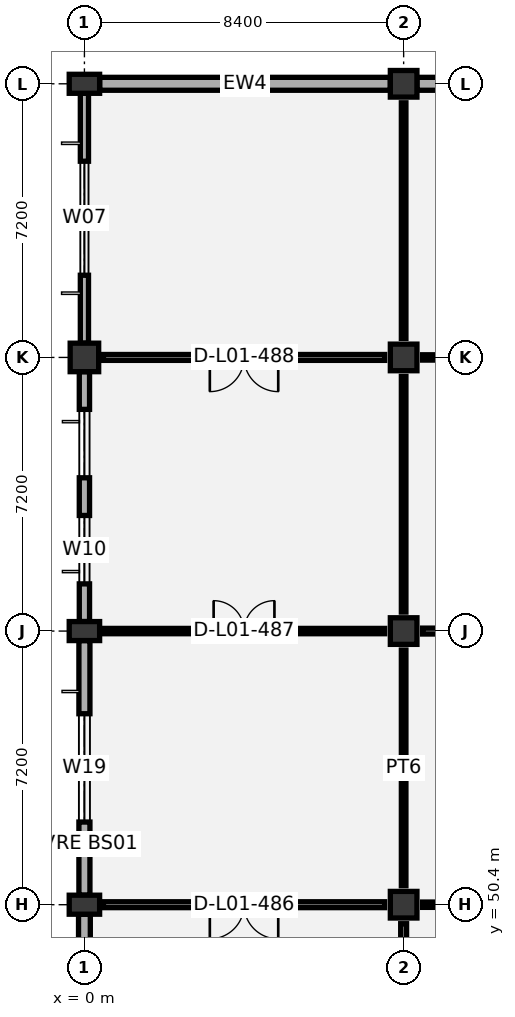
"""IFC4 building model, lengths in metres.
Left out: names, types, materials, properties, quantities, classifications, styles, units other than length and angle.
Written with IfcOpenShell. Run it as: python <this file> out.ifc"""

import sys

from ifc_helpers import new_model, si_unit, direction, frame, frame_2d, origin, origin_2d, place, context, subcontext, project, spatial, rectangle, circle, extrude, element, fill, save


model = new_model("IFC4")
c1 = context("Model", 3, precision=1e-05, world=origin(), true_north=direction((0.0, 1.0)))
c2 = subcontext(c1, "Body", "Model", "MODEL_VIEW")
j1 = project(units=[si_unit("LENGTHUNIT", "METRE"), si_unit("PLANEANGLEUNIT", "RADIAN")], contexts=[c1])
p1 = place(None, origin())
s1 = spatial("IfcSite", under=j1, at=p1, CompositionType="ELEMENT")
p2 = place(p1, origin())
s2 = spatial("IfcBuilding", under=s1, at=p2, CompositionType="ELEMENT")
p3 = place(p2, frame((0.0, 0.0, 6.0)))
s3 = spatial("IfcBuildingStorey", under=s2, at=p3, CompositionType="ELEMENT", Elevation=6.0)
for number, where, z_axis, x_axis in (
    (1, (0.0, 50.4, 0.0), (0.0, 0.0, 1.0), (0.0, 1.0, 0.0)),
    (2, (0.0, 57.6, 0.0), (0.0, 0.0, 1.0), (0.0, 1.0, 0.0)),
):
    element("IfcColumn", number, at=place(p3, frame(where, z_axis=z_axis, x_axis=x_axis)), inside=s3, PredefinedType="COLUMN", context=c2, shape_type="SweptSolid", body=[
        extrude(rectangle(XDim=0.5, YDim=0.8, at=origin_2d()), origin(), (0.0, 0.0, 1.0), 5.4),
    ])
p4 = place(p3, frame((0.0, 64.8, 0.0), z_axis=(0.0, 0.0, 1.0), x_axis=(1.0, 0.0, 0.0)))
e3 = element("IfcColumn", 3, at=p4, inside=s3, PredefinedType="COLUMN", context=c2, shape_type="SweptSolid", body=[
    extrude(circle(Radius=0.375, at=origin_2d()), origin(), (0.0, 0.0, 1.0), 5.4),
])
p5 = place(p3, frame((0.0, 72.0, 0.0), z_axis=(0.0, 0.0, 1.0), x_axis=(0.0, 1.0, 0.0)))
e4 = element("IfcColumn", 4, at=p5, inside=s3, PredefinedType="COLUMN", context=c2, shape_type="SweptSolid", body=[
    extrude(rectangle(XDim=0.5, YDim=0.8, at=origin_2d()), origin(), (0.0, 0.0, 1.0), 5.4),
])
for number, where, z_axis, x_axis in (
    (5, (8.4, 50.4, 0.0), (0.0, 0.0, 1.0), (1.0, 0.0, 0.0)),
    (6, (8.4, 57.6, 0.0), (0.0, 0.0, 1.0), (1.0, 0.0, 0.0)),
    (7, (8.4, 64.8, 0.0), (0.0, 0.0, 1.0), (1.0, 0.0, 0.0)),
    (8, (8.4, 72.0, 0.0), (0.0, 0.0, 1.0), (1.0, 0.0, 0.0)),
):
    element("IfcColumn", number, at=place(p3, frame(where, z_axis=z_axis, x_axis=x_axis)), inside=s3, PredefinedType="COLUMN", context=c2, shape_type="SweptSolid", body=[
        extrude(rectangle(XDim=0.7, YDim=0.7, at=origin_2d()), origin(), (0.0, 0.0, 1.0), 5.4),
    ])
p6 = place(p3, frame((0.0, 43.45, 0.0), z_axis=(0.0, 0.0, 1.0), x_axis=(0.0, 1.0, 0.0)))
e9 = element("IfcWall", 9, at=p6, inside=s3, PredefinedType="SOLIDWALL", context=c2, shape_type="SweptSolid", body=[
    extrude(rectangle(XDim=6.7, YDim=0.31, at=frame_2d((3.35, 0.0))), origin(), (0.0, 0.0, 1.0), 4.52),
])
p7 = place(p6, frame((2.0, 0.0, 0.9)))
e10 = element("IfcOpeningElement", 10, at=p7, cuts=e9, PredefinedType="OPENING", context=c2, shape_type="SweptSolid", body=[
    extrude(rectangle(XDim=2.7, YDim=2.1, at=frame_2d((1.35, 1.05))), frame((0.0, 0.165, 0.0), z_axis=(0.0, -1.0, 0.0), x_axis=(1.0, 0.0, 0.0)), (0.0, 0.0, 1.0), 0.33),
])
p8 = place(p3, frame((0.0, 50.65, 0.0), z_axis=(0.0, 0.0, 1.0), x_axis=(0.0, 1.0, 0.0)))
e11 = element("IfcWall", 11, at=p8, inside=s3, PredefinedType="SOLIDWALL", context=c2, shape_type="SweptSolid", body=[
    extrude(rectangle(XDim=6.7, YDim=0.29, at=frame_2d((3.35, 0.0))), origin(), (0.0, 0.0, 1.0), 4.52),
])
p9 = place(p8, frame((1.925, 0.0, 0.9)))
e12 = element("IfcOpeningElement", 12, at=p9, cuts=e11, PredefinedType="OPENING", context=c2, shape_type="SweptSolid", body=[
    extrude(rectangle(XDim=2.85, YDim=1.95, at=frame_2d((1.425, 0.975))), frame((0.0, 0.155, 0.0), z_axis=(0.0, -1.0, 0.0), x_axis=(1.0, 0.0, 0.0)), (0.0, 0.0, 1.0), 0.31),
])
p10 = place(p3, frame((0.0, 57.85, 0.0), z_axis=(0.0, 0.0, 1.0), x_axis=(0.0, 1.0, 0.0)))
e13 = element("IfcWall", 13, at=p10, inside=s3, PredefinedType="SOLIDWALL", context=c2, shape_type="SweptSolid", body=[
    extrude(rectangle(XDim=6.575, YDim=0.27, at=frame_2d((3.288, 0.0))), origin(), (0.0, 0.0, 1.0), 4.52),
])
p11 = place(p10, frame((0.992, 0.0, 0.9)))
e14 = element("IfcOpeningElement", 14, at=p11, cuts=e13, PredefinedType="OPENING", context=c2, shape_type="SweptSolid", body=[
    extrude(rectangle(XDim=1.8, YDim=2.1, at=frame_2d((0.9, 1.05))), frame((0.0, 0.145, 0.0), z_axis=(0.0, -1.0, 0.0), x_axis=(1.0, 0.0, 0.0)), (0.0, 0.0, 1.0), 0.29),
])
p12 = place(p10, frame((3.783, 0.0, 0.9)))
e15 = element("IfcOpeningElement", 15, at=p12, cuts=e13, PredefinedType="OPENING", context=c2, shape_type="SweptSolid", body=[
    extrude(rectangle(XDim=1.8, YDim=2.1, at=frame_2d((0.9, 1.05))), frame((0.0, 0.145, 0.0), z_axis=(0.0, -1.0, 0.0), x_axis=(1.0, 0.0, 0.0)), (0.0, 0.0, 1.0), 0.29),
])
p13 = place(p3, frame((0.4, 72.0, 0.0), z_axis=(0.0, 0.0, 1.0), x_axis=(1.0, 0.0, 0.0)))
e16 = element("IfcWall", 16, at=p13, inside=s3, PredefinedType="SOLIDWALL", context=c2, shape_type="SweptSolid", body=[
    extrude(rectangle(XDim=7.65, YDim=0.34, at=frame_2d((3.825, 0.0))), origin(), (0.0, 0.0, 1.0), 4.52),
])
p14 = place(p3, frame((0.0, 65.175, 0.0), z_axis=(0.0, 0.0, 1.0), x_axis=(0.0, 1.0, 0.0)))
e17 = element("IfcWall", 17, at=p14, inside=s3, PredefinedType="SOLIDWALL", context=c2, shape_type="SweptSolid", body=[
    extrude(rectangle(XDim=6.575, YDim=0.215, at=frame_2d((3.288, 0.0))), origin(), (0.0, 0.0, 1.0), 4.52),
])
p15 = place(p14, frame((1.788, 0.0, 0.9)))
e18 = element("IfcOpeningElement", 18, at=p15, cuts=e17, PredefinedType="OPENING", context=c2, shape_type="SweptSolid", body=[
    extrude(rectangle(XDim=3.0, YDim=2.1, at=frame_2d((1.5, 1.05))), frame((0.0, 0.117, 0.0), z_axis=(0.0, -1.0, 0.0), x_axis=(1.0, 0.0, 0.0)), (0.0, 0.0, 1.0), 0.235),
])
p16 = place(p3, frame((8.75, 72.0, 0.0), z_axis=(0.0, 0.0, 1.0), x_axis=(1.0, 0.0, 0.0)))
e19 = element("IfcWall", 19, at=p16, inside=s3, PredefinedType="SOLIDWALL", context=c2, shape_type="SweptSolid", body=[
    extrude(rectangle(XDim=7.7, YDim=0.34, at=frame_2d((3.85, 0.0))), origin(), (0.0, 0.0, 1.0), 4.42),
])
p17 = place(p3, frame((8.4, 43.7, 0.0), z_axis=(0.0, 0.0, 1.0), x_axis=(0.0, 1.0, 0.0)))
e20 = element("IfcWall", 20, at=p17, inside=s3, PredefinedType="PARTITIONING", context=c2, shape_type="SweptSolid", body=[
    extrude(rectangle(XDim=6.2, YDim=0.155, at=frame_2d((3.1, 0.0))), origin(), (0.0, 0.0, 1.0), 4.78),
])
p18 = place(p17, frame((2.3, 0.0, 0.0)))
e21 = element("IfcOpeningElement", 21, at=p18, cuts=e20, PredefinedType="OPENING", context=c2, shape_type="SweptSolid", body=[
    extrude(rectangle(XDim=1.6, YDim=2.2, at=frame_2d((0.8, 1.1))), frame((0.0, 0.087, 0.0), z_axis=(0.0, -1.0, 0.0), x_axis=(1.0, 0.0, 0.0)), (0.0, 0.0, 1.0), 0.175),
])
p19 = place(p3, frame((0.5, 50.4, 0.0), z_axis=(0.0, 0.0, 1.0), x_axis=(1.0, 0.0, 0.0)))
e22 = element("IfcWall", 22, at=p19, inside=s3, PredefinedType="PARTITIONING", context=c2, shape_type="SweptSolid", body=[
    extrude(rectangle(XDim=7.4, YDim=0.155, at=frame_2d((3.7, 0.0))), origin(), (0.0, 0.0, 1.0), 4.37),
])
p20 = place(p19, frame((2.8, 0.0, 0.0)))
e23 = element("IfcOpeningElement", 23, at=p20, cuts=e22, PredefinedType="OPENING", context=c2, shape_type="SweptSolid", body=[
    extrude(rectangle(XDim=1.8, YDim=2.25, at=frame_2d((0.9, 1.125))), frame((0.0, 0.087, 0.0), z_axis=(0.0, -1.0, 0.0), x_axis=(1.0, 0.0, 0.0)), (0.0, 0.0, 1.0), 0.175),
])
p21 = place(p3, frame((8.4, 50.9, 0.0), z_axis=(0.0, 0.0, 1.0), x_axis=(0.0, 1.0, 0.0)))
e24 = element("IfcWall", 24, at=p21, inside=s3, PredefinedType="PARTITIONING", context=c2, shape_type="SweptSolid", body=[
    extrude(rectangle(XDim=6.2, YDim=0.12, at=frame_2d((3.1, 0.0))), origin(), (0.0, 0.0, 1.0), 4.32),
])
p22 = place(p3, frame((0.5, 57.6, 0.0), z_axis=(0.0, 0.0, 1.0), x_axis=(1.0, 0.0, 0.0)))
e25 = element("IfcWall", 25, at=p22, inside=s3, PredefinedType="PARTITIONING", context=c2, shape_type="SweptSolid", body=[
    extrude(rectangle(XDim=7.4, YDim=0.14, at=frame_2d((3.7, 0.0))), origin(), (0.0, 0.0, 1.0), 4.37),
])
p23 = place(p22, frame((2.9, 0.0, 0.0)))
e26 = element("IfcOpeningElement", 26, at=p23, cuts=e25, PredefinedType="OPENING", context=c2, shape_type="SweptSolid", body=[
    extrude(rectangle(XDim=1.6, YDim=2.2, at=frame_2d((0.8, 1.1))), frame((0.0, 0.08, 0.0), z_axis=(0.0, -1.0, 0.0), x_axis=(1.0, 0.0, 0.0)), (0.0, 0.0, 1.0), 0.16),
])
p24 = place(p3, frame((8.4, 58.1, 0.0), z_axis=(0.0, 0.0, 1.0), x_axis=(0.0, 1.0, 0.0)))
e27 = element("IfcWall", 27, at=p24, inside=s3, PredefinedType="PARTITIONING", context=c2, shape_type="SweptSolid", body=[
    extrude(rectangle(XDim=6.2, YDim=0.12, at=frame_2d((3.1, 0.0))), origin(), (0.0, 0.0, 1.0), 4.57),
])
p25 = place(p3, frame((0.5, 64.8, 0.0), z_axis=(0.0, 0.0, 1.0), x_axis=(1.0, 0.0, 0.0)))
e28 = element("IfcWall", 28, at=p25, inside=s3, PredefinedType="PARTITIONING", context=c2, shape_type="SweptSolid", body=[
    extrude(rectangle(XDim=7.4, YDim=0.155, at=frame_2d((3.7, 0.0))), origin(), (0.0, 0.0, 1.0), 4.37),
])
p26 = place(p25, frame((2.8, 0.0, 0.0)))
e29 = element("IfcOpeningElement", 29, at=p26, cuts=e28, PredefinedType="OPENING", context=c2, shape_type="SweptSolid", body=[
    extrude(rectangle(XDim=1.8, YDim=2.25, at=frame_2d((0.9, 1.125))), frame((0.0, 0.087, 0.0), z_axis=(0.0, -1.0, 0.0), x_axis=(1.0, 0.0, 0.0)), (0.0, 0.0, 1.0), 0.175),
])
p27 = place(p3, frame((8.4, 65.3, 0.0), z_axis=(0.0, 0.0, 1.0), x_axis=(0.0, 1.0, 0.0)))
e30 = element("IfcWall", 30, at=p27, inside=s3, PredefinedType="PARTITIONING", context=c2, shape_type="SweptSolid", body=[
    extrude(rectangle(XDim=6.2, YDim=0.12, at=frame_2d((3.1, 0.0))), origin(), (0.0, 0.0, 1.0), 4.32),
])
p28 = place(p3, frame((8.9, 50.4, 0.0), z_axis=(0.0, 0.0, 1.0), x_axis=(1.0, 0.0, 0.0)))
e31 = element("IfcWall", 31, at=p28, inside=s3, PredefinedType="PARTITIONING", context=c2, shape_type="SweptSolid", body=[
    extrude(rectangle(XDim=7.4, YDim=0.14, at=frame_2d((3.7, 0.0))), origin(), (0.0, 0.0, 1.0), 4.27),
])
p29 = place(p28, frame((2.9, 0.0, 0.0)))
e32 = element("IfcOpeningElement", 32, at=p29, cuts=e31, PredefinedType="OPENING", context=c2, shape_type="SweptSolid", body=[
    extrude(rectangle(XDim=1.6, YDim=2.2, at=frame_2d((0.8, 1.1))), frame((0.0, 0.08, 0.0), z_axis=(0.0, -1.0, 0.0), x_axis=(1.0, 0.0, 0.0)), (0.0, 0.0, 1.0), 0.16),
])
p30 = place(p3, frame((8.9, 57.6, 0.0), z_axis=(0.0, 0.0, 1.0), x_axis=(1.0, 0.0, 0.0)))
e33 = element("IfcWall", 33, at=p30, inside=s3, PredefinedType="PARTITIONING", context=c2, shape_type="SweptSolid", body=[
    extrude(rectangle(XDim=7.4, YDim=0.155, at=frame_2d((3.7, 0.0))), origin(), (0.0, 0.0, 1.0), 4.27),
])
p31 = place(p30, frame((2.8, 0.0, 0.0)))
e34 = element("IfcOpeningElement", 34, at=p31, cuts=e33, PredefinedType="OPENING", context=c2, shape_type="SweptSolid", body=[
    extrude(rectangle(XDim=1.8, YDim=2.25, at=frame_2d((0.9, 1.125))), frame((0.0, 0.087, 0.0), z_axis=(0.0, -1.0, 0.0), x_axis=(1.0, 0.0, 0.0)), (0.0, 0.0, 1.0), 0.175),
])
p32 = place(p3, frame((8.9, 64.8, 0.0), z_axis=(0.0, 0.0, 1.0), x_axis=(1.0, 0.0, 0.0)))
e35 = element("IfcWall", 35, at=p32, inside=s3, PredefinedType="PARTITIONING", context=c2, shape_type="SweptSolid", body=[
    extrude(rectangle(XDim=7.4, YDim=0.14, at=frame_2d((3.7, 0.0))), origin(), (0.0, 0.0, 1.0), 4.27),
])
p33 = place(p32, frame((2.9, 0.0, 0.0)))
e36 = element("IfcOpeningElement", 36, at=p33, cuts=e35, PredefinedType="OPENING", context=c2, shape_type="SweptSolid", body=[
    extrude(rectangle(XDim=1.6, YDim=2.2, at=frame_2d((0.8, 1.1))), frame((0.0, 0.08, 0.0), z_axis=(0.0, -1.0, 0.0), x_axis=(1.0, 0.0, 0.0)), (0.0, 0.0, 1.0), 0.16),
])
p34 = place(p9, origin())
e37 = element("IfcWindow", 37, at=p34, inside=s3, PartitioningType="SINGLE_PANEL", PredefinedType="WINDOW", context=c2, shape_type="SweptSolid", body=[
    extrude(rectangle(XDim=2.85, YDim=1.95, at=frame_2d((1.425, 0.975))), frame((0.0, 0.03, 0.0), z_axis=(0.0, -1.0, 0.0), x_axis=(1.0, 0.0, 0.0)), (0.0, 0.0, 1.0), 0.06),
])
fill(e12, e37)
p35 = place(p11, origin())
e38 = element("IfcWindow", 38, at=p35, inside=s3, PartitioningType="SINGLE_PANEL", PredefinedType="WINDOW", context=c2, shape_type="SweptSolid", body=[
    extrude(rectangle(XDim=1.8, YDim=2.1, at=frame_2d((0.9, 1.05))), frame((0.0, 0.03, 0.0), z_axis=(0.0, -1.0, 0.0), x_axis=(1.0, 0.0, 0.0)), (0.0, 0.0, 1.0), 0.06),
])
fill(e14, e38)
p36 = place(p12, origin())
e39 = element("IfcWindow", 39, at=p36, inside=s3, PartitioningType="SINGLE_PANEL", PredefinedType="WINDOW", context=c2, shape_type="SweptSolid", body=[
    extrude(rectangle(XDim=1.8, YDim=2.1, at=frame_2d((0.9, 1.05))), frame((0.0, 0.03, 0.0), z_axis=(0.0, -1.0, 0.0), x_axis=(1.0, 0.0, 0.0)), (0.0, 0.0, 1.0), 0.06),
])
fill(e15, e39)
p37 = place(p15, origin())
e40 = element("IfcWindow", 40, at=p37, inside=s3, PartitioningType="SINGLE_PANEL", PredefinedType="WINDOW", context=c2, shape_type="SweptSolid", body=[
    extrude(rectangle(XDim=3.0, YDim=2.1, at=frame_2d((1.5, 1.05))), frame((0.0, 0.03, 0.0), z_axis=(0.0, -1.0, 0.0), x_axis=(1.0, 0.0, 0.0)), (0.0, 0.0, 1.0), 0.06),
])
fill(e18, e40)
p38 = place(p20, frame((1.8, 0.0, 0.0), z_axis=(0.0, 0.0, 1.0), x_axis=(-1.0, 0.0, 0.0)))
e41 = element("IfcDoor", 41, at=p38, inside=s3, OperationType="DOUBLE_DOOR_SINGLE_SWING", PredefinedType="DOOR", context=c2, shape_type="SweptSolid", body=[
    extrude(rectangle(XDim=1.8, YDim=2.25, at=frame_2d((0.9, 1.125))), frame((0.0, 0.025, 0.0), z_axis=(0.0, -1.0, 0.0), x_axis=(1.0, 0.0, 0.0)), (0.0, 0.0, 1.0), 0.05),
])
fill(e23, e41)
p39 = place(p23, origin())
e42 = element("IfcDoor", 42, at=p39, inside=s3, OperationType="DOUBLE_DOOR_SINGLE_SWING", PredefinedType="DOOR", context=c2, shape_type="SweptSolid", body=[
    extrude(rectangle(XDim=1.6, YDim=2.2, at=frame_2d((0.8, 1.1))), frame((0.0, 0.025, 0.0), z_axis=(0.0, -1.0, 0.0), x_axis=(1.0, 0.0, 0.0)), (0.0, 0.0, 1.0), 0.05),
])
fill(e26, e42)
p40 = place(p26, frame((1.8, 0.0, 0.0), z_axis=(0.0, 0.0, 1.0), x_axis=(-1.0, 0.0, 0.0)))
e43 = element("IfcDoor", 43, at=p40, inside=s3, OperationType="DOUBLE_DOOR_SINGLE_SWING", PredefinedType="DOOR", context=c2, shape_type="SweptSolid", body=[
    extrude(rectangle(XDim=1.8, YDim=2.25, at=frame_2d((0.9, 1.125))), frame((0.0, 0.025, 0.0), z_axis=(0.0, -1.0, 0.0), x_axis=(1.0, 0.0, 0.0)), (0.0, 0.0, 1.0), 0.05),
])
fill(e29, e43)
save(model, sys.argv[1])
